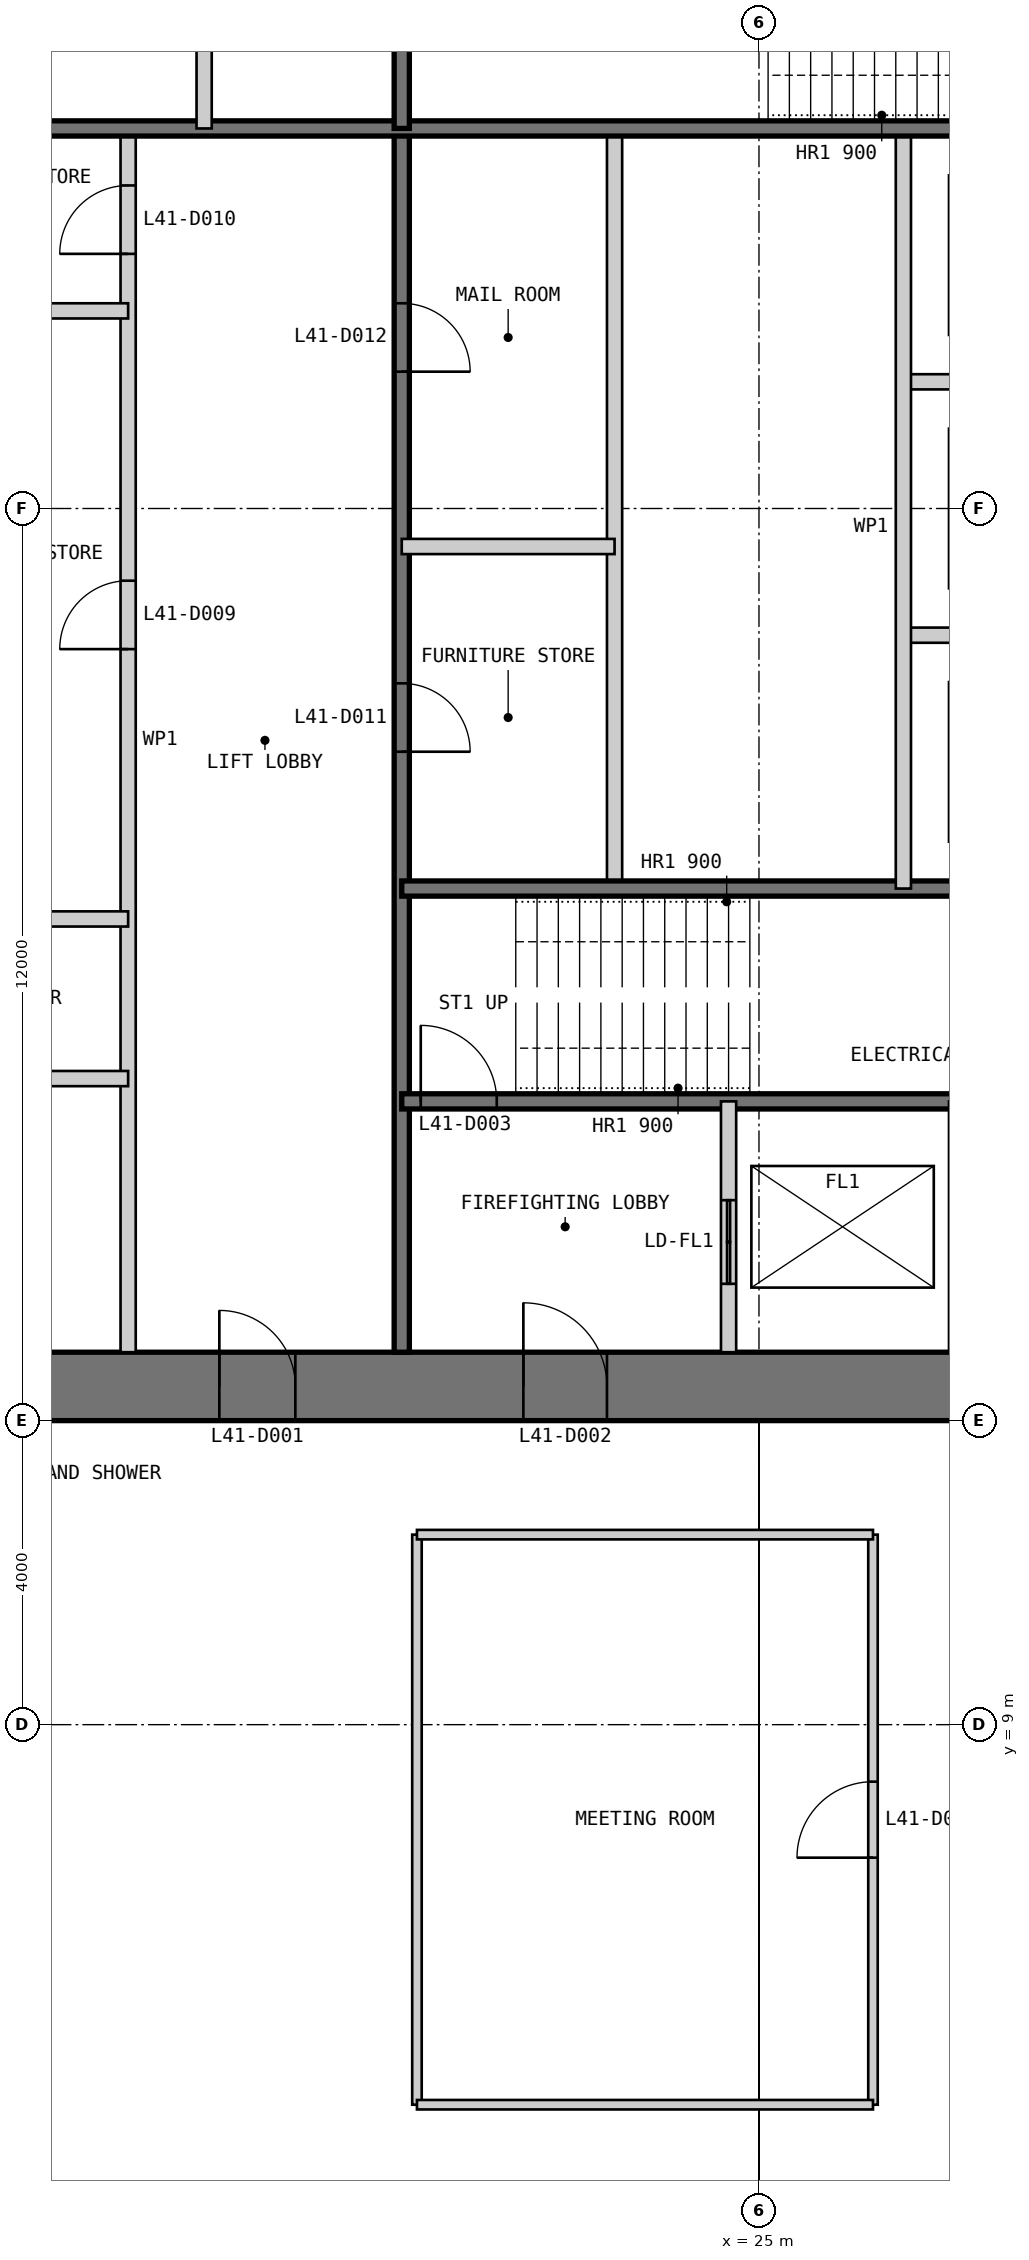
"""IFC4 building model, lengths in metres.
Left out: names, types, materials, properties, quantities, classifications, styles, units other than length and angle.
Written with IfcOpenShell. Run it as: python <this file> out.ifc"""

import sys

from ifc_helpers import new_model, si_unit, direction, frame, frame_2d, origin, place, context, subcontext, project, spatial, polyline, rectangle, outline, extrude, element, fill, save


model = new_model("IFC4")
c1 = context("Model", 3, precision=1e-05, world=origin(), true_north=direction((0.0, 1.0)))
c2 = subcontext(c1, "Body", "Model", "MODEL_VIEW")
j1 = project(units=[si_unit("LENGTHUNIT", "METRE"), si_unit("PLANEANGLEUNIT", "RADIAN")], contexts=[c1])
p1 = place(None, origin())
s1 = spatial("IfcSite", under=j1, at=p1, CompositionType="ELEMENT")
p2 = place(p1, origin())
s2 = spatial("IfcBuilding", under=s1, at=p2, CompositionType="ELEMENT")
p3 = place(p2, frame((0.0, 0.0, 177.8)))
s3 = spatial("IfcBuildingStorey", under=s2, at=p3, CompositionType="ELEMENT", Elevation=177.8)
p4 = place(p3, frame((13.0, 13.45, 0.0), z_axis=(0.0, 0.0, 1.0), x_axis=(1.0, 0.0, 0.0)))
e1 = element("IfcWall", 1, at=p4, inside=s3, PredefinedType="SHEAR", context=c2, shape_type="SweptSolid", body=[
    extrude(outline(polyline([(0.0, -0.45), (24.0, -0.45), (23.1, 0.45), (0.9, 0.45), (0.0, -0.45)])), origin(), (0.0, 0.0, 1.0), 4.0),
])
p5 = place(p4, frame((4.9, 0.0, 0.0)))
e2 = element("IfcOpeningElement", 2, at=p5, cuts=e1, PredefinedType="OPENING", context=c2, shape_type="SweptSolid", body=[
    extrude(rectangle(XDim=1.0, YDim=2.2, at=frame_2d((0.5, 1.1))), frame((0.0, 0.46, 0.0), z_axis=(0.0, -1.0, 0.0), x_axis=(1.0, 0.0, 0.0)), (0.0, 0.0, 1.0), 0.92),
])
p6 = place(p4, frame((8.9, 0.0, 0.0)))
e3 = element("IfcOpeningElement", 3, at=p6, cuts=e1, PredefinedType="OPENING", context=c2, shape_type="SweptSolid", body=[
    extrude(rectangle(XDim=1.1, YDim=2.2, at=frame_2d((0.55, 1.1))), frame((0.0, 0.46, 0.0), z_axis=(0.0, -1.0, 0.0), x_axis=(1.0, 0.0, 0.0)), (0.0, 0.0, 1.0), 0.92),
])
p7 = place(p4, frame((15.05, 0.0, 0.0)))
e4 = element("IfcOpeningElement", 4, at=p7, cuts=e1, PredefinedType="OPENING", context=c2, shape_type="SweptSolid", body=[
    extrude(rectangle(XDim=0.9, YDim=2.2, at=frame_2d((0.45, 1.1))), frame((0.0, 0.46, 0.0), z_axis=(0.0, -1.0, 0.0), x_axis=(1.0, 0.0, 0.0)), (0.0, 0.0, 1.0), 0.92),
])
p8 = place(p4, frame((17.9, 0.0, 0.0)))
e5 = element("IfcOpeningElement", 5, at=p8, cuts=e1, PredefinedType="OPENING", context=c2, shape_type="SweptSolid", body=[
    extrude(rectangle(XDim=1.0, YDim=2.2, at=frame_2d((0.5, 1.1))), frame((0.0, 0.46, 0.0), z_axis=(0.0, -1.0, 0.0), x_axis=(1.0, 0.0, 0.0)), (0.0, 0.0, 1.0), 0.92),
])
p9 = place(p4, frame((21.4, 0.0, 0.0)))
e6 = element("IfcOpeningElement", 6, at=p9, cuts=e1, PredefinedType="OPENING", context=c2, shape_type="SweptSolid", body=[
    extrude(rectangle(XDim=1.0, YDim=2.2, at=frame_2d((0.5, 1.1))), frame((0.0, 0.46, 0.0), z_axis=(0.0, -1.0, 0.0), x_axis=(1.0, 0.0, 0.0)), (0.0, 0.0, 1.0), 0.92),
])
p10 = place(p3, frame((16.7, 13.9, 0.0), z_axis=(0.0, 0.0, 1.0), x_axis=(0.0, 1.0, 0.0)))
e7 = element("IfcWall", 7, at=p10, inside=s3, PredefinedType="PARTITIONING", context=c2, shape_type="SweptSolid", body=[
    extrude(rectangle(XDim=16.1, YDim=0.2, at=frame_2d((8.05, 0.0))), origin(), (0.0, 0.0, 1.0), 3.8),
])
p11 = place(p10, frame((9.25, 0.0, 0.0)))
e8 = element("IfcOpeningElement", 8, at=p11, cuts=e7, PredefinedType="OPENING", context=c2, shape_type="SweptSolid", body=[
    extrude(rectangle(XDim=0.9, YDim=2.2, at=frame_2d((0.45, 1.1))), frame((0.0, 0.11, 0.0), z_axis=(0.0, -1.0, 0.0), x_axis=(1.0, 0.0, 0.0)), (0.0, 0.0, 1.0), 0.22),
])
p12 = place(p10, frame((14.45, 0.0, 0.0)))
e9 = element("IfcOpeningElement", 9, at=p12, cuts=e7, PredefinedType="OPENING", context=c2, shape_type="SweptSolid", body=[
    extrude(rectangle(XDim=0.9, YDim=2.2, at=frame_2d((0.45, 1.1))), frame((0.0, 0.11, 0.0), z_axis=(0.0, -1.0, 0.0), x_axis=(1.0, 0.0, 0.0)), (0.0, 0.0, 1.0), 0.22),
])
p13 = place(p3, frame((20.3, 13.9, 0.0), z_axis=(0.0, 0.0, 1.0), x_axis=(0.0, 1.0, 0.0)))
e10 = element("IfcWall", 10, at=p13, inside=s3, PredefinedType="SOLIDWALL", context=c2, shape_type="SweptSolid", body=[
    extrude(rectangle(XDim=16.1, YDim=0.2, at=frame_2d((8.05, 0.0))), origin(), (0.0, 0.0, 1.0), 3.8),
])
p14 = place(p13, frame((7.9, 0.0, 0.0)))
e11 = element("IfcOpeningElement", 11, at=p14, cuts=e10, PredefinedType="OPENING", context=c2, shape_type="SweptSolid", body=[
    extrude(rectangle(XDim=0.9, YDim=2.2, at=frame_2d((0.45, 1.1))), frame((0.0, 0.11, 0.0), z_axis=(0.0, -1.0, 0.0), x_axis=(1.0, 0.0, 0.0)), (0.0, 0.0, 1.0), 0.22),
])
p15 = place(p13, frame((12.9, 0.0, 0.0)))
e12 = element("IfcOpeningElement", 12, at=p15, cuts=e10, PredefinedType="OPENING", context=c2, shape_type="SweptSolid", body=[
    extrude(rectangle(XDim=0.9, YDim=2.2, at=frame_2d((0.45, 1.1))), frame((0.0, 0.11, 0.0), z_axis=(0.0, -1.0, 0.0), x_axis=(1.0, 0.0, 0.0)), (0.0, 0.0, 1.0), 0.22),
])
p16 = place(p3, frame((23.1, 20.0, 0.0), z_axis=(0.0, 0.0, 1.0), x_axis=(0.0, 1.0, 0.0)))
e13 = element("IfcWall", 13, at=p16, inside=s3, PredefinedType="PARTITIONING", context=c2, shape_type="SweptSolid", body=[
    extrude(rectangle(XDim=10.0, YDim=0.2, at=frame_2d((5.0, 0.0))), origin(), (0.0, 0.0, 1.0), 3.8),
])
p17 = place(p3, frame((20.3, 17.2, 0.0), z_axis=(0.0, 0.0, 1.0), x_axis=(1.0, 0.0, 0.0)))
e14 = element("IfcWall", 14, at=p17, inside=s3, PredefinedType="SOLIDWALL", context=c2, shape_type="SweptSolid", body=[
    extrude(rectangle(XDim=9.4, YDim=0.2, at=frame_2d((4.7, 0.0))), origin(), (0.0, 0.0, 1.0), 3.8),
])
p18 = place(p17, frame((0.25, 0.0, 0.0)))
e15 = element("IfcOpeningElement", 15, at=p18, cuts=e14, PredefinedType="OPENING", context=c2, shape_type="SweptSolid", body=[
    extrude(rectangle(XDim=1.0, YDim=2.2, at=frame_2d((0.5, 1.1))), frame((0.0, 0.11, 0.0), z_axis=(0.0, -1.0, 0.0), x_axis=(1.0, 0.0, 0.0)), (0.0, 0.0, 1.0), 0.22),
])
p19 = place(p3, frame((20.3, 20.0, 0.0), z_axis=(0.0, 0.0, 1.0), x_axis=(1.0, 0.0, 0.0)))
e16 = element("IfcWall", 16, at=p19, inside=s3, PredefinedType="SOLIDWALL", context=c2, shape_type="SweptSolid", body=[
    extrude(rectangle(XDim=15.8, YDim=0.2, at=frame_2d((7.9, 0.0))), origin(), (0.0, 0.0, 1.0), 3.8),
])
p20 = place(p3, frame((24.6, 13.9, 0.0), z_axis=(0.0, 0.0, 1.0), x_axis=(0.0, 1.0, 0.0)))
e17 = element("IfcWall", 17, at=p20, inside=s3, PredefinedType="PARTITIONING", context=c2, shape_type="SweptSolid", body=[
    extrude(rectangle(XDim=3.3, YDim=0.2, at=frame_2d((1.65, 0.0))), origin(), (0.0, 0.0, 1.0), 3.8),
])
p21 = place(p20, frame((0.9, 0.0, 0.0)))
e18 = element("IfcOpeningElement", 18, at=p21, cuts=e17, PredefinedType="OPENING", context=c2, shape_type="SweptSolid", body=[
    extrude(rectangle(XDim=1.1, YDim=2.2, at=frame_2d((0.55, 1.1))), frame((0.0, 0.11, 0.0), z_axis=(0.0, -1.0, 0.0), x_axis=(1.0, 0.0, 0.0)), (0.0, 0.0, 1.0), 0.22),
])
for number, where, z_axis, x_axis in (
    (19, (13.9, 17.5, 0.0), (0.0, 0.0, 1.0), (1.0, 0.0, 0.0)),
    (20, (13.9, 19.6, 0.0), (0.0, 0.0, 1.0), (1.0, 0.0, 0.0)),
    (21, (13.9, 27.6, 0.0), (0.0, 0.0, 1.0), (1.0, 0.0, 0.0)),
    (22, (20.3, 24.5, 0.0), (0.0, 0.0, 1.0), (1.0, 0.0, 0.0)),
    (23, (29.7, 26.667, 0.0), (0.0, 0.0, 1.0), (-1.0, 0.0, 0.0)),
    (24, (29.7, 23.333, 0.0), (0.0, 0.0, 1.0), (-1.0, 0.0, 0.0)),
):
    element("IfcWall", number, at=place(p3, frame(where, z_axis=z_axis, x_axis=x_axis)), inside=s3, PredefinedType="PARTITIONING", context=c2, shape_type="SweptSolid", body=[
        extrude(rectangle(XDim=2.8, YDim=0.2, at=frame_2d((1.4, 0.0))), origin(), (0.0, 0.0, 1.0), 3.8),
    ])
p22 = place(p3, frame((26.9, 30.0, 0.0), z_axis=(0.0, 0.0, 1.0), x_axis=(0.0, -1.0, 0.0)))
e25 = element("IfcWall", 25, at=p22, inside=s3, PredefinedType="PARTITIONING", context=c2, shape_type="SweptSolid", body=[
    extrude(rectangle(XDim=10.0, YDim=0.2, at=frame_2d((5.0, 0.0))), origin(), (0.0, 0.0, 1.0), 3.8),
])
p23 = place(p3, frame((29.7, 30.0, 0.0), z_axis=(0.0, 0.0, 1.0), x_axis=(-1.0, 0.0, 0.0)))
e26 = element("IfcWall", 26, at=p23, inside=s3, PredefinedType="SOLIDWALL", context=c2, shape_type="SweptSolid", body=[
    extrude(rectangle(XDim=15.8, YDim=0.2, at=frame_2d((7.9, 0.0))), origin(), (0.0, 0.0, 1.0), 3.8),
])
p24 = place(p3, frame((20.3, 36.1, 0.0), z_axis=(0.0, 0.0, 1.0), x_axis=(0.0, -1.0, 0.0)))
e27 = element("IfcWall", 27, at=p24, inside=s3, PredefinedType="SOLIDWALL", context=c2, shape_type="SweptSolid", body=[
    extrude(rectangle(XDim=6.1, YDim=0.2, at=frame_2d((3.05, 0.0))), origin(), (0.0, 0.0, 1.0), 3.8),
])
p25 = place(p3, frame((17.7, 36.1, 0.0), z_axis=(0.0, 0.0, 1.0), x_axis=(0.0, -1.0, 0.0)))
e28 = element("IfcWall", 28, at=p25, inside=s3, PredefinedType="PARTITIONING", context=c2, shape_type="SweptSolid", body=[
    extrude(rectangle(XDim=6.1, YDim=0.2, at=frame_2d((3.05, 0.0))), origin(), (0.0, 0.0, 1.0), 3.8),
])
p26 = place(p3, frame((20.5, 4.0, 0.0), z_axis=(0.0, 0.0, 1.0), x_axis=(0.0, 1.0, 0.0)))
e29 = element("IfcWall", 29, at=p26, inside=s3, PredefinedType="PARTITIONING", context=c2, shape_type="SweptSolid", body=[
    extrude(rectangle(XDim=7.5, YDim=0.125, at=frame_2d((3.75, 0.0))), origin(), (0.0, 0.0, 1.0), 3.85),
])
p27 = place(p3, frame((26.5, 4.0, 0.0), z_axis=(0.0, 0.0, 1.0), x_axis=(0.0, 1.0, 0.0)))
e30 = element("IfcWall", 30, at=p27, inside=s3, PredefinedType="PARTITIONING", context=c2, shape_type="SweptSolid", body=[
    extrude(rectangle(XDim=7.5, YDim=0.125, at=frame_2d((3.75, 0.0))), origin(), (0.0, 0.0, 1.0), 3.85),
])
p28 = place(p27, frame((3.25, 0.0, 0.0)))
e31 = element("IfcOpeningElement", 31, at=p28, cuts=e30, PredefinedType="OPENING", context=c2, shape_type="SweptSolid", body=[
    extrude(rectangle(XDim=1.0, YDim=2.2, at=frame_2d((0.5, 1.1))), frame((0.0, 0.073, 0.0), z_axis=(0.0, -1.0, 0.0), x_axis=(1.0, 0.0, 0.0)), (0.0, 0.0, 1.0), 0.145),
])
for number, where, z_axis, x_axis in (
    (32, (20.5, 4.0, 0.0), (0.0, 0.0, 1.0), (1.0, 0.0, 0.0)),
    (33, (20.5, 11.5, 0.0), (0.0, 0.0, 1.0), (1.0, 0.0, 0.0)),
):
    element("IfcWall", number, at=place(p3, frame(where, z_axis=z_axis, x_axis=x_axis)), inside=s3, PredefinedType="PARTITIONING", context=c2, shape_type="SweptSolid", body=[
        extrude(rectangle(XDim=6.0, YDim=0.125, at=frame_2d((3.0, 0.0))), origin(), (0.0, 0.0, 1.0), 3.85),
    ])
p29 = place(p5, origin())
e34 = element("IfcDoor", 34, at=p29, inside=s3, OperationType="SINGLE_SWING_LEFT", PredefinedType="DOOR", context=c2, shape_type="SweptSolid", body=[
    extrude(rectangle(XDim=1.0, YDim=2.2, at=frame_2d((0.5, 1.1))), frame((0.0, 0.025, 0.0), z_axis=(0.0, -1.0, 0.0), x_axis=(1.0, 0.0, 0.0)), (0.0, 0.0, 1.0), 0.05),
    extrude(outline(polyline([(0.0, 0.0), (0.04, 0.0), (0.04, 2.16), (0.96, 2.16), (0.96, 0.0), (1.0, 0.0), (1.0, 2.2), (0.0, 2.2), (0.0, 0.0)])), frame((0.0, 0.3, 0.0), z_axis=(0.0, -1.0, 0.0), x_axis=(1.0, 0.0, 0.0)), (0.0, 0.0, 1.0), 0.6),
])
fill(e2, e34)
p30 = place(p6, origin())
e35 = element("IfcDoor", 35, at=p30, inside=s3, OperationType="SINGLE_SWING_LEFT", PredefinedType="DOOR", context=c2, shape_type="SweptSolid", body=[
    extrude(rectangle(XDim=1.1, YDim=2.2, at=frame_2d((0.55, 1.1))), frame((0.0, 0.025, 0.0), z_axis=(0.0, -1.0, 0.0), x_axis=(1.0, 0.0, 0.0)), (0.0, 0.0, 1.0), 0.05),
    extrude(outline(polyline([(0.0, 0.0), (0.04, 0.0), (0.04, 2.16), (1.06, 2.16), (1.06, 0.0), (1.1, 0.0), (1.1, 2.2), (0.0, 2.2), (0.0, 0.0)])), frame((0.0, 0.3, 0.0), z_axis=(0.0, -1.0, 0.0), x_axis=(1.0, 0.0, 0.0)), (0.0, 0.0, 1.0), 0.6),
])
fill(e3, e35)
p31 = place(p18, origin())
e36 = element("IfcDoor", 36, at=p31, inside=s3, OperationType="SINGLE_SWING_LEFT", PredefinedType="DOOR", context=c2, shape_type="SweptSolid", body=[
    extrude(rectangle(XDim=1.0, YDim=2.2, at=frame_2d((0.5, 1.1))), frame((0.0, 0.025, 0.0), z_axis=(0.0, -1.0, 0.0), x_axis=(1.0, 0.0, 0.0)), (0.0, 0.0, 1.0), 0.05),
])
fill(e15, e36)
p32 = place(p11, origin())
e37 = element("IfcDoor", 37, at=p32, inside=s3, OperationType="SINGLE_SWING_LEFT", PredefinedType="DOOR", context=c2, shape_type="SweptSolid", body=[
    extrude(rectangle(XDim=0.9, YDim=2.2, at=frame_2d((0.45, 1.1))), frame((0.0, 0.025, 0.0), z_axis=(0.0, -1.0, 0.0), x_axis=(1.0, 0.0, 0.0)), (0.0, 0.0, 1.0), 0.05),
])
fill(e8, e37)
p33 = place(p12, origin())
e38 = element("IfcDoor", 38, at=p33, inside=s3, OperationType="SINGLE_SWING_LEFT", PredefinedType="DOOR", context=c2, shape_type="SweptSolid", body=[
    extrude(rectangle(XDim=0.9, YDim=2.2, at=frame_2d((0.45, 1.1))), frame((0.0, 0.025, 0.0), z_axis=(0.0, -1.0, 0.0), x_axis=(1.0, 0.0, 0.0)), (0.0, 0.0, 1.0), 0.05),
])
fill(e9, e38)
p34 = place(p14, frame((0.9, 0.0, 0.0), z_axis=(0.0, 0.0, 1.0), x_axis=(-1.0, 0.0, 0.0)))
e39 = element("IfcDoor", 39, at=p34, inside=s3, OperationType="SINGLE_SWING_RIGHT", PredefinedType="DOOR", context=c2, shape_type="SweptSolid", body=[
    extrude(rectangle(XDim=0.9, YDim=2.2, at=frame_2d((0.45, 1.1))), frame((0.0, 0.025, 0.0), z_axis=(0.0, -1.0, 0.0), x_axis=(1.0, 0.0, 0.0)), (0.0, 0.0, 1.0), 0.05),
])
fill(e11, e39)
p35 = place(p15, frame((0.9, 0.0, 0.0), z_axis=(0.0, 0.0, 1.0), x_axis=(-1.0, 0.0, 0.0)))
e40 = element("IfcDoor", 40, at=p35, inside=s3, OperationType="SINGLE_SWING_RIGHT", PredefinedType="DOOR", context=c2, shape_type="SweptSolid", body=[
    extrude(rectangle(XDim=0.9, YDim=2.2, at=frame_2d((0.45, 1.1))), frame((0.0, 0.025, 0.0), z_axis=(0.0, -1.0, 0.0), x_axis=(1.0, 0.0, 0.0)), (0.0, 0.0, 1.0), 0.05),
])
fill(e12, e40)
p36 = place(p28, origin())
e41 = element("IfcDoor", 41, at=p36, inside=s3, OperationType="SINGLE_SWING_LEFT", PredefinedType="DOOR", context=c2, shape_type="SweptSolid", body=[
    extrude(rectangle(XDim=1.0, YDim=2.2, at=frame_2d((0.5, 1.1))), frame((0.0, 0.025, 0.0), z_axis=(0.0, -1.0, 0.0), x_axis=(1.0, 0.0, 0.0)), (0.0, 0.0, 1.0), 0.05),
])
fill(e31, e41)
p37 = place(p21, origin())
e42 = element("IfcDoor", 42, at=p37, inside=s3, OperationType="DOUBLE_DOOR_SLIDING", PredefinedType="DOOR", context=c2, shape_type="SweptSolid", body=[
    extrude(rectangle(XDim=1.1, YDim=2.2, at=frame_2d((0.55, 1.1))), frame((0.0, 0.025, 0.0), z_axis=(0.0, -1.0, 0.0), x_axis=(1.0, 0.0, 0.0)), (0.0, 0.0, 1.0), 0.05),
])
fill(e18, e42)
save(model, sys.argv[1])
